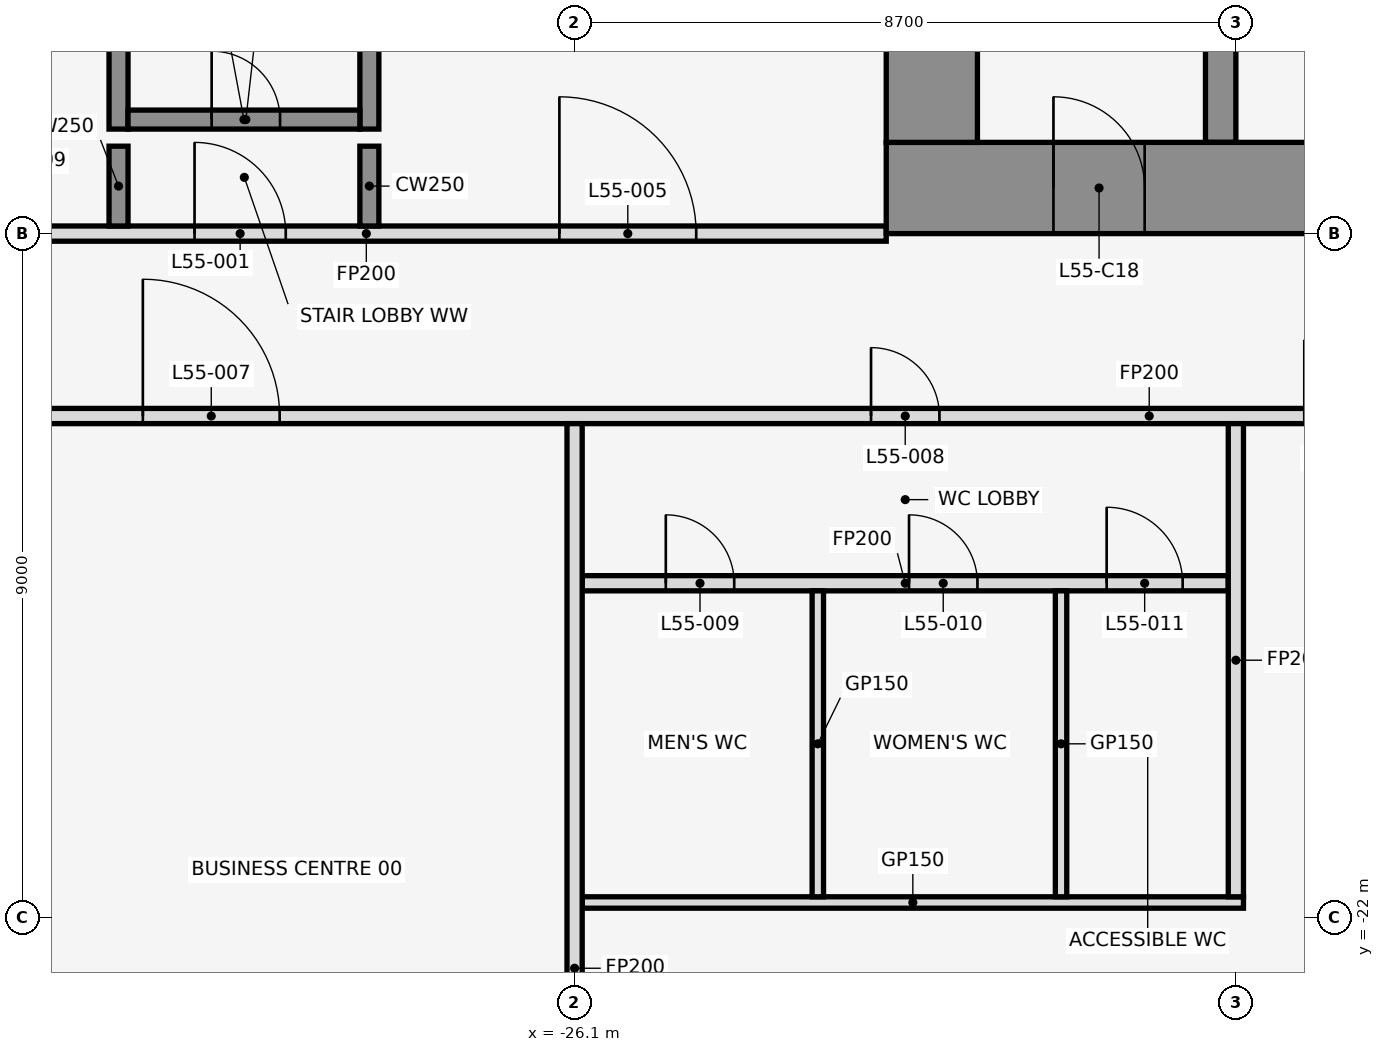
"""IFC4 building model, lengths in metres.
Left out: names, types, materials, properties, quantities, classifications, styles, units other than length and angle.
Written with IfcOpenShell. Run it as: python <this file> out.ifc"""

import sys

from ifc_helpers import new_model, si_unit, direction, frame, frame_2d, origin, place, context, subcontext, project, spatial, rectangle, extrude, element, fill, save


model = new_model("IFC4")
c1 = context("Model", 3, precision=1e-05, world=origin(), true_north=direction((0.0, 1.0)))
c2 = subcontext(c1, "Body", "Model", "MODEL_VIEW")
j1 = project(units=[si_unit("LENGTHUNIT", "METRE"), si_unit("PLANEANGLEUNIT", "RADIAN")], contexts=[c1])
p1 = place(None, origin())
s1 = spatial("IfcSite", under=j1, at=p1, CompositionType="ELEMENT")
p2 = place(p1, origin())
s2 = spatial("IfcBuilding", under=s1, at=p2, CompositionType="ELEMENT")
p3 = place(p2, frame((0.0, 0.0, 245.6)))
s3 = spatial("IfcBuildingStorey", under=s2, at=p3, CompositionType="ELEMENT", Elevation=245.6)
p4 = place(p3, frame((-32.1, -11.625, 0.0), z_axis=(0.0, 0.0, 1.0), x_axis=(0.0, 1.0, 0.0)))
e1 = element("IfcWall", 1, at=p4, inside=s3, PredefinedType="SHEAR", context=c2, shape_type="SweptSolid", body=[
    extrude(rectangle(XDim=7.525, YDim=0.25, at=frame_2d((3.762, 0.0))), origin(), (0.0, 0.0, 1.0), 4.2),
])
p5 = place(p3, frame((-28.8, -11.625, 0.0), z_axis=(0.0, 0.0, 1.0), x_axis=(0.0, 1.0, 0.0)))
e2 = element("IfcWall", 2, at=p5, inside=s3, PredefinedType="SHEAR", context=c2, shape_type="SweptSolid", body=[
    extrude(rectangle(XDim=7.25, YDim=0.25, at=frame_2d((3.625, 0.0))), origin(), (0.0, 0.0, 1.0), 4.2),
])
p6 = place(p3, frame((-31.975, -11.5, 0.0), z_axis=(0.0, 0.0, 1.0), x_axis=(1.0, 0.0, 0.0)))
e3 = element("IfcWall", 3, at=p6, inside=s3, PredefinedType="SHEAR", context=c2, shape_type="SweptSolid", body=[
    extrude(rectangle(XDim=3.05, YDim=0.25, at=frame_2d((1.525, 0.0))), origin(), (0.0, 0.0, 1.0), 4.2),
])
p7 = place(p6, frame((1.1, 0.0, 0.0)))
e4 = element("IfcOpeningElement", 4, at=p7, cuts=e3, PredefinedType="OPENING", context=c2, shape_type="SweptSolid", body=[
    extrude(rectangle(XDim=0.9, YDim=2.1, at=frame_2d((0.45, 1.05))), frame((0.0, 0.137, 0.0), z_axis=(0.0, -1.0, 0.0), x_axis=(1.0, 0.0, 0.0)), (0.0, 0.0, 1.0), 0.274),
])
p8 = place(p3, frame((-26.0, -21.8, 0.0), z_axis=(0.0, 0.0, 1.0), x_axis=(1.0, 0.0, 0.0)))
e5 = element("IfcWall", 5, at=p8, inside=s3, PredefinedType="PARTITIONING", context=c2, shape_type="SweptSolid", body=[
    extrude(rectangle(XDim=8.7, YDim=0.15, at=frame_2d((4.35, 0.0))), origin(), (0.0, 0.0, 1.0), 3.039),
])
p9 = place(p3, frame((-26.0, -17.6, 0.0), z_axis=(0.0, 0.0, 1.0), x_axis=(1.0, 0.0, 0.0)))
e6 = element("IfcWall", 6, at=p9, inside=s3, PredefinedType="PARTITIONING", context=c2, shape_type="SweptSolid", body=[
    extrude(rectangle(XDim=8.5, YDim=0.2, at=frame_2d((4.25, 0.0))), origin(), (0.0, 0.0, 1.0), 3.039),
])
p10 = place(p9, frame((1.1, 0.0, 0.0)))
e7 = element("IfcOpeningElement", 7, at=p10, cuts=e6, PredefinedType="OPENING", context=c2, shape_type="SweptSolid", body=[
    extrude(rectangle(XDim=0.9, YDim=2.1, at=frame_2d((0.45, 1.05))), frame((0.0, 0.112, 0.0), z_axis=(0.0, -1.0, 0.0), x_axis=(1.0, 0.0, 0.0)), (0.0, 0.0, 1.0), 0.224),
])
p11 = place(p9, frame((4.3, 0.0, 0.0)))
e8 = element("IfcOpeningElement", 8, at=p11, cuts=e6, PredefinedType="OPENING", context=c2, shape_type="SweptSolid", body=[
    extrude(rectangle(XDim=0.9, YDim=2.1, at=frame_2d((0.45, 1.05))), frame((0.0, 0.112, 0.0), z_axis=(0.0, -1.0, 0.0), x_axis=(1.0, 0.0, 0.0)), (0.0, 0.0, 1.0), 0.224),
])
p12 = place(p9, frame((6.9, 0.0, 0.0)))
e9 = element("IfcOpeningElement", 9, at=p12, cuts=e6, PredefinedType="OPENING", context=c2, shape_type="SweptSolid", body=[
    extrude(rectangle(XDim=1.0, YDim=2.1, at=frame_2d((0.5, 1.05))), frame((0.0, 0.112, 0.0), z_axis=(0.0, -1.0, 0.0), x_axis=(1.0, 0.0, 0.0)), (0.0, 0.0, 1.0), 0.224),
])
p13 = place(p3, frame((-35.68, -15.4, 0.0), z_axis=(0.0, 0.0, 1.0), x_axis=(1.0, 0.0, 0.0)))
e10 = element("IfcWall", 10, at=p13, inside=s3, PredefinedType="PARTITIONING", context=c2, shape_type="SweptSolid", body=[
    extrude(rectangle(XDim=34.28, YDim=0.2, at=frame_2d((17.14, 0.0))), origin(), (0.0, 0.0, 1.0), 3.039),
])
p14 = place(p13, frame((3.9, 0.0, 0.0)))
e11 = element("IfcOpeningElement", 11, at=p14, cuts=e10, PredefinedType="OPENING", context=c2, shape_type="SweptSolid", body=[
    extrude(rectangle(XDim=1.8, YDim=2.1, at=frame_2d((0.9, 1.05))), frame((0.0, 0.112, 0.0), z_axis=(0.0, -1.0, 0.0), x_axis=(1.0, 0.0, 0.0)), (0.0, 0.0, 1.0), 0.224),
])
p15 = place(p13, frame((13.48, 0.0, 0.0)))
e12 = element("IfcOpeningElement", 12, at=p15, cuts=e10, PredefinedType="OPENING", context=c2, shape_type="SweptSolid", body=[
    extrude(rectangle(XDim=0.9, YDim=2.1, at=frame_2d((0.45, 1.05))), frame((0.0, 0.112, 0.0), z_axis=(0.0, -1.0, 0.0), x_axis=(1.0, 0.0, 0.0)), (0.0, 0.0, 1.0), 0.224),
])
p16 = place(p13, frame((19.18, 0.0, 0.0)))
e13 = element("IfcOpeningElement", 13, at=p16, cuts=e10, PredefinedType="OPENING", context=c2, shape_type="SweptSolid", body=[
    extrude(rectangle(XDim=1.0, YDim=2.1, at=frame_2d((0.5, 1.05))), frame((0.0, 0.112, 0.0), z_axis=(0.0, -1.0, 0.0), x_axis=(1.0, 0.0, 0.0)), (0.0, 0.0, 1.0), 0.224),
])
p17 = place(p13, frame((23.58, 0.0, 0.0)))
e14 = element("IfcOpeningElement", 14, at=p17, cuts=e10, PredefinedType="OPENING", context=c2, shape_type="SweptSolid", body=[
    extrude(rectangle(XDim=1.0, YDim=2.1, at=frame_2d((0.5, 1.05))), frame((0.0, 0.112, 0.0), z_axis=(0.0, -1.0, 0.0), x_axis=(1.0, 0.0, 0.0)), (0.0, 0.0, 1.0), 0.224),
])
p18 = place(p3, frame((-35.68, -13.0, 0.0), z_axis=(0.0, 0.0, 1.0), x_axis=(1.0, 0.0, 0.0)))
e15 = element("IfcWall", 15, at=p18, inside=s3, PredefinedType="PARTITIONING", context=c2, shape_type="SweptSolid", body=[
    extrude(rectangle(XDim=13.68, YDim=0.2, at=frame_2d((6.84, 0.0))), origin(), (0.0, 0.0, 1.0), 3.039),
])
p19 = place(p18, frame((4.58, 0.0, 0.0)))
e16 = element("IfcOpeningElement", 16, at=p19, cuts=e15, PredefinedType="OPENING", context=c2, shape_type="SweptSolid", body=[
    extrude(rectangle(XDim=1.2, YDim=2.1, at=frame_2d((0.6, 1.05))), frame((0.0, 0.112, 0.0), z_axis=(0.0, -1.0, 0.0), x_axis=(1.0, 0.0, 0.0)), (0.0, 0.0, 1.0), 0.224),
])
p20 = place(p18, frame((9.38, 0.0, 0.0)))
e17 = element("IfcOpeningElement", 17, at=p20, cuts=e15, PredefinedType="OPENING", context=c2, shape_type="SweptSolid", body=[
    extrude(rectangle(XDim=1.8, YDim=2.1, at=frame_2d((0.9, 1.05))), frame((0.0, 0.112, 0.0), z_axis=(0.0, -1.0, 0.0), x_axis=(1.0, 0.0, 0.0)), (0.0, 0.0, 1.0), 0.224),
])
for number, where, z_axis, x_axis in (
    (18, (-32.1, -12.9, 0.0), (0.0, 0.0, 1.0), (0.0, 1.0, 0.0)),
    (19, (-28.8, -12.9, 0.0), (0.0, 0.0, 1.0), (0.0, 1.0, 0.0)),
):
    element("IfcWall", number, at=place(p3, frame(where, z_axis=z_axis, x_axis=x_axis)), inside=s3, PredefinedType="SHEAR", context=c2, shape_type="SweptSolid", body=[
        extrude(rectangle(XDim=1.05, YDim=0.25, at=frame_2d((0.525, 0.0))), origin(), (0.0, 0.0, 1.0), 4.2),
    ])
p21 = place(p3, frame((-26.1, -29.83, 0.0), z_axis=(0.0, 0.0, 1.0), x_axis=(0.0, 1.0, 0.0)))
e20 = element("IfcWall", 20, at=p21, inside=s3, PredefinedType="PARTITIONING", context=c2, shape_type="SweptSolid", body=[
    extrude(rectangle(XDim=14.33, YDim=0.2, at=frame_2d((7.165, 0.0))), origin(), (0.0, 0.0, 1.0), 3.039),
])
for number, where, z_axis, x_axis in (
    (21, (-22.9, -21.725, 0.0), (0.0, 0.0, 1.0), (0.0, 1.0, 0.0)),
    (22, (-19.7, -21.725, 0.0), (0.0, 0.0, 1.0), (0.0, 1.0, 0.0)),
):
    element("IfcWall", number, at=place(p3, frame(where, z_axis=z_axis, x_axis=x_axis)), inside=s3, PredefinedType="PARTITIONING", context=c2, shape_type="SweptSolid", body=[
        extrude(rectangle(XDim=4.025, YDim=0.15, at=frame_2d((2.013, 0.0))), origin(), (0.0, 0.0, 1.0), 3.039),
    ])
p22 = place(p3, frame((-17.4, -21.725, 0.0), z_axis=(0.0, 0.0, 1.0), x_axis=(0.0, 1.0, 0.0)))
e23 = element("IfcWall", 23, at=p22, inside=s3, PredefinedType="PARTITIONING", context=c2, shape_type="SweptSolid", body=[
    extrude(rectangle(XDim=6.225, YDim=0.2, at=frame_2d((3.113, 0.0))), origin(), (0.0, 0.0, 1.0), 3.039),
])
p23 = place(p3, frame((-17.6, -11.8, 0.0), z_axis=(0.0, 0.0, 1.0), x_axis=(0.0, 1.0, 0.0)))
e24 = element("IfcWall", 24, at=p23, inside=s3, PredefinedType="SHEAR", context=c2, shape_type="SweptSolid", body=[
    extrude(rectangle(XDim=10.6, YDim=0.4, at=frame_2d((5.3, 0.0))), origin(), (0.0, 0.0, 1.0), 4.2),
])
p24 = place(p23, frame((1.25, 0.0, 0.0)))
e25 = element("IfcOpeningElement", 25, at=p24, cuts=e24, PredefinedType="OPENING", context=c2, shape_type="SweptSolid", body=[
    extrude(rectangle(XDim=1.1, YDim=2.1, at=frame_2d((0.55, 1.05))), frame((0.0, 0.212, 0.0), z_axis=(0.0, -1.0, 0.0), x_axis=(1.0, 0.0, 0.0)), (0.0, 0.0, 1.0), 0.424),
])
p25 = place(p23, frame((3.95, 0.0, 0.0)))
e26 = element("IfcOpeningElement", 26, at=p25, cuts=e24, PredefinedType="OPENING", context=c2, shape_type="SweptSolid", body=[
    extrude(rectangle(XDim=1.1, YDim=2.1, at=frame_2d((0.55, 1.05))), frame((0.0, 0.212, 0.0), z_axis=(0.0, -1.0, 0.0), x_axis=(1.0, 0.0, 0.0)), (0.0, 0.0, 1.0), 0.424),
])
p26 = place(p3, frame((-22.0, -12.4, 0.0), z_axis=(0.0, 0.0, 1.0), x_axis=(1.0, 0.0, 0.0)))
e27 = element("IfcWall", 27, at=p26, inside=s3, PredefinedType="SHEAR", context=c2, shape_type="SweptSolid", body=[
    extrude(rectangle(XDim=44.0, YDim=1.2, at=frame_2d((22.0, 0.0))), origin(), (0.0, 0.0, 1.0), 4.2),
])
p27 = place(p26, frame((2.2, 0.0, 0.0)))
e28 = element("IfcOpeningElement", 28, at=p27, cuts=e27, PredefinedType="OPENING", context=c2, shape_type="SweptSolid", body=[
    extrude(rectangle(XDim=1.2, YDim=2.1, at=frame_2d((0.6, 1.05))), frame((0.0, 0.612, 0.0), z_axis=(0.0, -1.0, 0.0), x_axis=(1.0, 0.0, 0.0)), (0.0, 0.0, 1.0), 1.224),
])
p28 = place(p26, frame((21.4, 0.0, 0.0)))
e29 = element("IfcOpeningElement", 29, at=p28, cuts=e27, PredefinedType="OPENING", context=c2, shape_type="SweptSolid", body=[
    extrude(rectangle(XDim=1.2, YDim=2.1, at=frame_2d((0.6, 1.05))), frame((0.0, 0.612, 0.0), z_axis=(0.0, -1.0, 0.0), x_axis=(1.0, 0.0, 0.0)), (0.0, 0.0, 1.0), 1.224),
])
p29 = place(p26, frame((40.6, 0.0, 0.0)))
e30 = element("IfcOpeningElement", 30, at=p29, cuts=e27, PredefinedType="OPENING", context=c2, shape_type="SweptSolid", body=[
    extrude(rectangle(XDim=1.2, YDim=2.1, at=frame_2d((0.6, 1.05))), frame((0.0, 0.612, 0.0), z_axis=(0.0, -1.0, 0.0), x_axis=(1.0, 0.0, 0.0)), (0.0, 0.0, 1.0), 1.224),
])
p30 = place(p26, frame((16.0, 0.0, 0.0)))
e31 = element("IfcOpeningElement", 31, at=p30, cuts=e27, PredefinedType="OPENING", context=c2, shape_type="SweptSolid", body=[
    extrude(rectangle(XDim=1.8, YDim=2.1, at=frame_2d((0.9, 1.05))), frame((0.0, 0.612, 0.0), z_axis=(0.0, -1.0, 0.0), x_axis=(1.0, 0.0, 0.0)), (0.0, 0.0, 1.0), 1.224),
])
p31 = place(p26, frame((6.3, 0.0, 0.0)))
e32 = element("IfcOpeningElement", 32, at=p31, cuts=e27, PredefinedType="OPENING", context=c2, shape_type="SweptSolid", body=[
    extrude(rectangle(XDim=1.2, YDim=2.1, at=frame_2d((0.6, 1.05))), frame((0.0, 0.612, 0.0), z_axis=(0.0, -1.0, 0.0), x_axis=(1.0, 0.0, 0.0)), (0.0, 0.0, 1.0), 1.224),
])
p32 = place(p26, frame((26.2, 0.0, 0.0)))
e33 = element("IfcOpeningElement", 33, at=p32, cuts=e27, PredefinedType="OPENING", context=c2, shape_type="SweptSolid", body=[
    extrude(rectangle(XDim=1.8, YDim=2.1, at=frame_2d((0.9, 1.05))), frame((0.0, 0.612, 0.0), z_axis=(0.0, -1.0, 0.0), x_axis=(1.0, 0.0, 0.0)), (0.0, 0.0, 1.0), 1.224),
])
p33 = place(p26, frame((36.5, 0.0, 0.0)))
e34 = element("IfcOpeningElement", 34, at=p33, cuts=e27, PredefinedType="OPENING", context=c2, shape_type="SweptSolid", body=[
    extrude(rectangle(XDim=1.2, YDim=2.1, at=frame_2d((0.6, 1.05))), frame((0.0, 0.612, 0.0), z_axis=(0.0, -1.0, 0.0), x_axis=(1.0, 0.0, 0.0)), (0.0, 0.0, 1.0), 1.224),
])
p34 = place(p3, frame((-21.4, -11.8, 0.0), z_axis=(0.0, 0.0, 1.0), x_axis=(0.0, 1.0, 0.0)))
e35 = element("IfcWall", 35, at=p34, inside=s3, PredefinedType="SHEAR", context=c2, shape_type="SweptSolid", body=[
    extrude(rectangle(XDim=10.6, YDim=1.2, at=frame_2d((5.3, 0.0))), origin(), (0.0, 0.0, 1.0), 4.2),
])
p35 = place(p19, origin())
e36 = element("IfcDoor", 36, at=p35, inside=s3, OperationType="SINGLE_SWING_LEFT", PredefinedType="DOOR", context=c2, shape_type="SweptSolid", body=[
    extrude(rectangle(XDim=1.2, YDim=2.1, at=frame_2d((0.6, 1.05))), frame((0.0, 0.025, 0.0), z_axis=(0.0, -1.0, 0.0), x_axis=(1.0, 0.0, 0.0)), (0.0, 0.0, 1.0), 0.05),
])
fill(e16, e36)
p36 = place(p7, origin())
e37 = element("IfcDoor", 37, at=p36, inside=s3, OperationType="SINGLE_SWING_LEFT", PredefinedType="DOOR", context=c2, shape_type="SweptSolid", body=[
    extrude(rectangle(XDim=0.9, YDim=2.1, at=frame_2d((0.45, 1.05))), frame((0.0, 0.025, 0.0), z_axis=(0.0, -1.0, 0.0), x_axis=(1.0, 0.0, 0.0)), (0.0, 0.0, 1.0), 0.05),
])
fill(e4, e37)
p37 = place(p20, origin())
e38 = element("IfcDoor", 38, at=p37, inside=s3, OperationType="SINGLE_SWING_LEFT", PredefinedType="DOOR", context=c2, shape_type="SweptSolid", body=[
    extrude(rectangle(XDim=1.8, YDim=2.1, at=frame_2d((0.9, 1.05))), frame((0.0, 0.025, 0.0), z_axis=(0.0, -1.0, 0.0), x_axis=(1.0, 0.0, 0.0)), (0.0, 0.0, 1.0), 0.05),
])
fill(e17, e38)
p38 = place(p14, origin())
e39 = element("IfcDoor", 39, at=p38, inside=s3, OperationType="SINGLE_SWING_LEFT", PredefinedType="DOOR", context=c2, shape_type="SweptSolid", body=[
    extrude(rectangle(XDim=1.8, YDim=2.1, at=frame_2d((0.9, 1.05))), frame((0.0, 0.025, 0.0), z_axis=(0.0, -1.0, 0.0), x_axis=(1.0, 0.0, 0.0)), (0.0, 0.0, 1.0), 0.05),
])
fill(e11, e39)
p39 = place(p15, frame((0.9, 0.0, 0.0), z_axis=(0.0, 0.0, 1.0), x_axis=(-1.0, 0.0, 0.0)))
e40 = element("IfcDoor", 40, at=p39, inside=s3, OperationType="SINGLE_SWING_RIGHT", PredefinedType="DOOR", context=c2, shape_type="SweptSolid", body=[
    extrude(rectangle(XDim=0.9, YDim=2.1, at=frame_2d((0.45, 1.05))), frame((0.0, 0.025, 0.0), z_axis=(0.0, -1.0, 0.0), x_axis=(1.0, 0.0, 0.0)), (0.0, 0.0, 1.0), 0.05),
])
fill(e12, e40)
p40 = place(p10, frame((0.9, 0.0, 0.0), z_axis=(0.0, 0.0, 1.0), x_axis=(-1.0, 0.0, 0.0)))
e41 = element("IfcDoor", 41, at=p40, inside=s3, OperationType="SINGLE_SWING_RIGHT", PredefinedType="DOOR", context=c2, shape_type="SweptSolid", body=[
    extrude(rectangle(XDim=0.9, YDim=2.1, at=frame_2d((0.45, 1.05))), frame((0.0, 0.025, 0.0), z_axis=(0.0, -1.0, 0.0), x_axis=(1.0, 0.0, 0.0)), (0.0, 0.0, 1.0), 0.05),
])
fill(e7, e41)
p41 = place(p11, frame((0.9, 0.0, 0.0), z_axis=(0.0, 0.0, 1.0), x_axis=(-1.0, 0.0, 0.0)))
e42 = element("IfcDoor", 42, at=p41, inside=s3, OperationType="SINGLE_SWING_LEFT", PredefinedType="DOOR", context=c2, shape_type="SweptSolid", body=[
    extrude(rectangle(XDim=0.9, YDim=2.1, at=frame_2d((0.45, 1.05))), frame((0.0, 0.025, 0.0), z_axis=(0.0, -1.0, 0.0), x_axis=(1.0, 0.0, 0.0)), (0.0, 0.0, 1.0), 0.05),
])
fill(e8, e42)
p42 = place(p12, frame((1.0, 0.0, 0.0), z_axis=(0.0, 0.0, 1.0), x_axis=(-1.0, 0.0, 0.0)))
e43 = element("IfcDoor", 43, at=p42, inside=s3, OperationType="SINGLE_SWING_RIGHT", PredefinedType="DOOR", context=c2, shape_type="SweptSolid", body=[
    extrude(rectangle(XDim=1.0, YDim=2.1, at=frame_2d((0.5, 1.05))), frame((0.0, 0.025, 0.0), z_axis=(0.0, -1.0, 0.0), x_axis=(1.0, 0.0, 0.0)), (0.0, 0.0, 1.0), 0.05),
])
fill(e9, e43)
p43 = place(p27, frame((1.2, 0.0, 0.0), z_axis=(0.0, 0.0, 1.0), x_axis=(-1.0, 0.0, 0.0)))
e44 = element("IfcDoor", 44, at=p43, inside=s3, OperationType="SINGLE_SWING_RIGHT", PredefinedType="DOOR", context=c2, shape_type="SweptSolid", body=[
    extrude(rectangle(XDim=1.2, YDim=2.1, at=frame_2d((0.6, 1.05))), frame((0.0, 0.025, 0.0), z_axis=(0.0, -1.0, 0.0), x_axis=(1.0, 0.0, 0.0)), (0.0, 0.0, 1.0), 0.05),
])
fill(e28, e44)
save(model, sys.argv[1])
